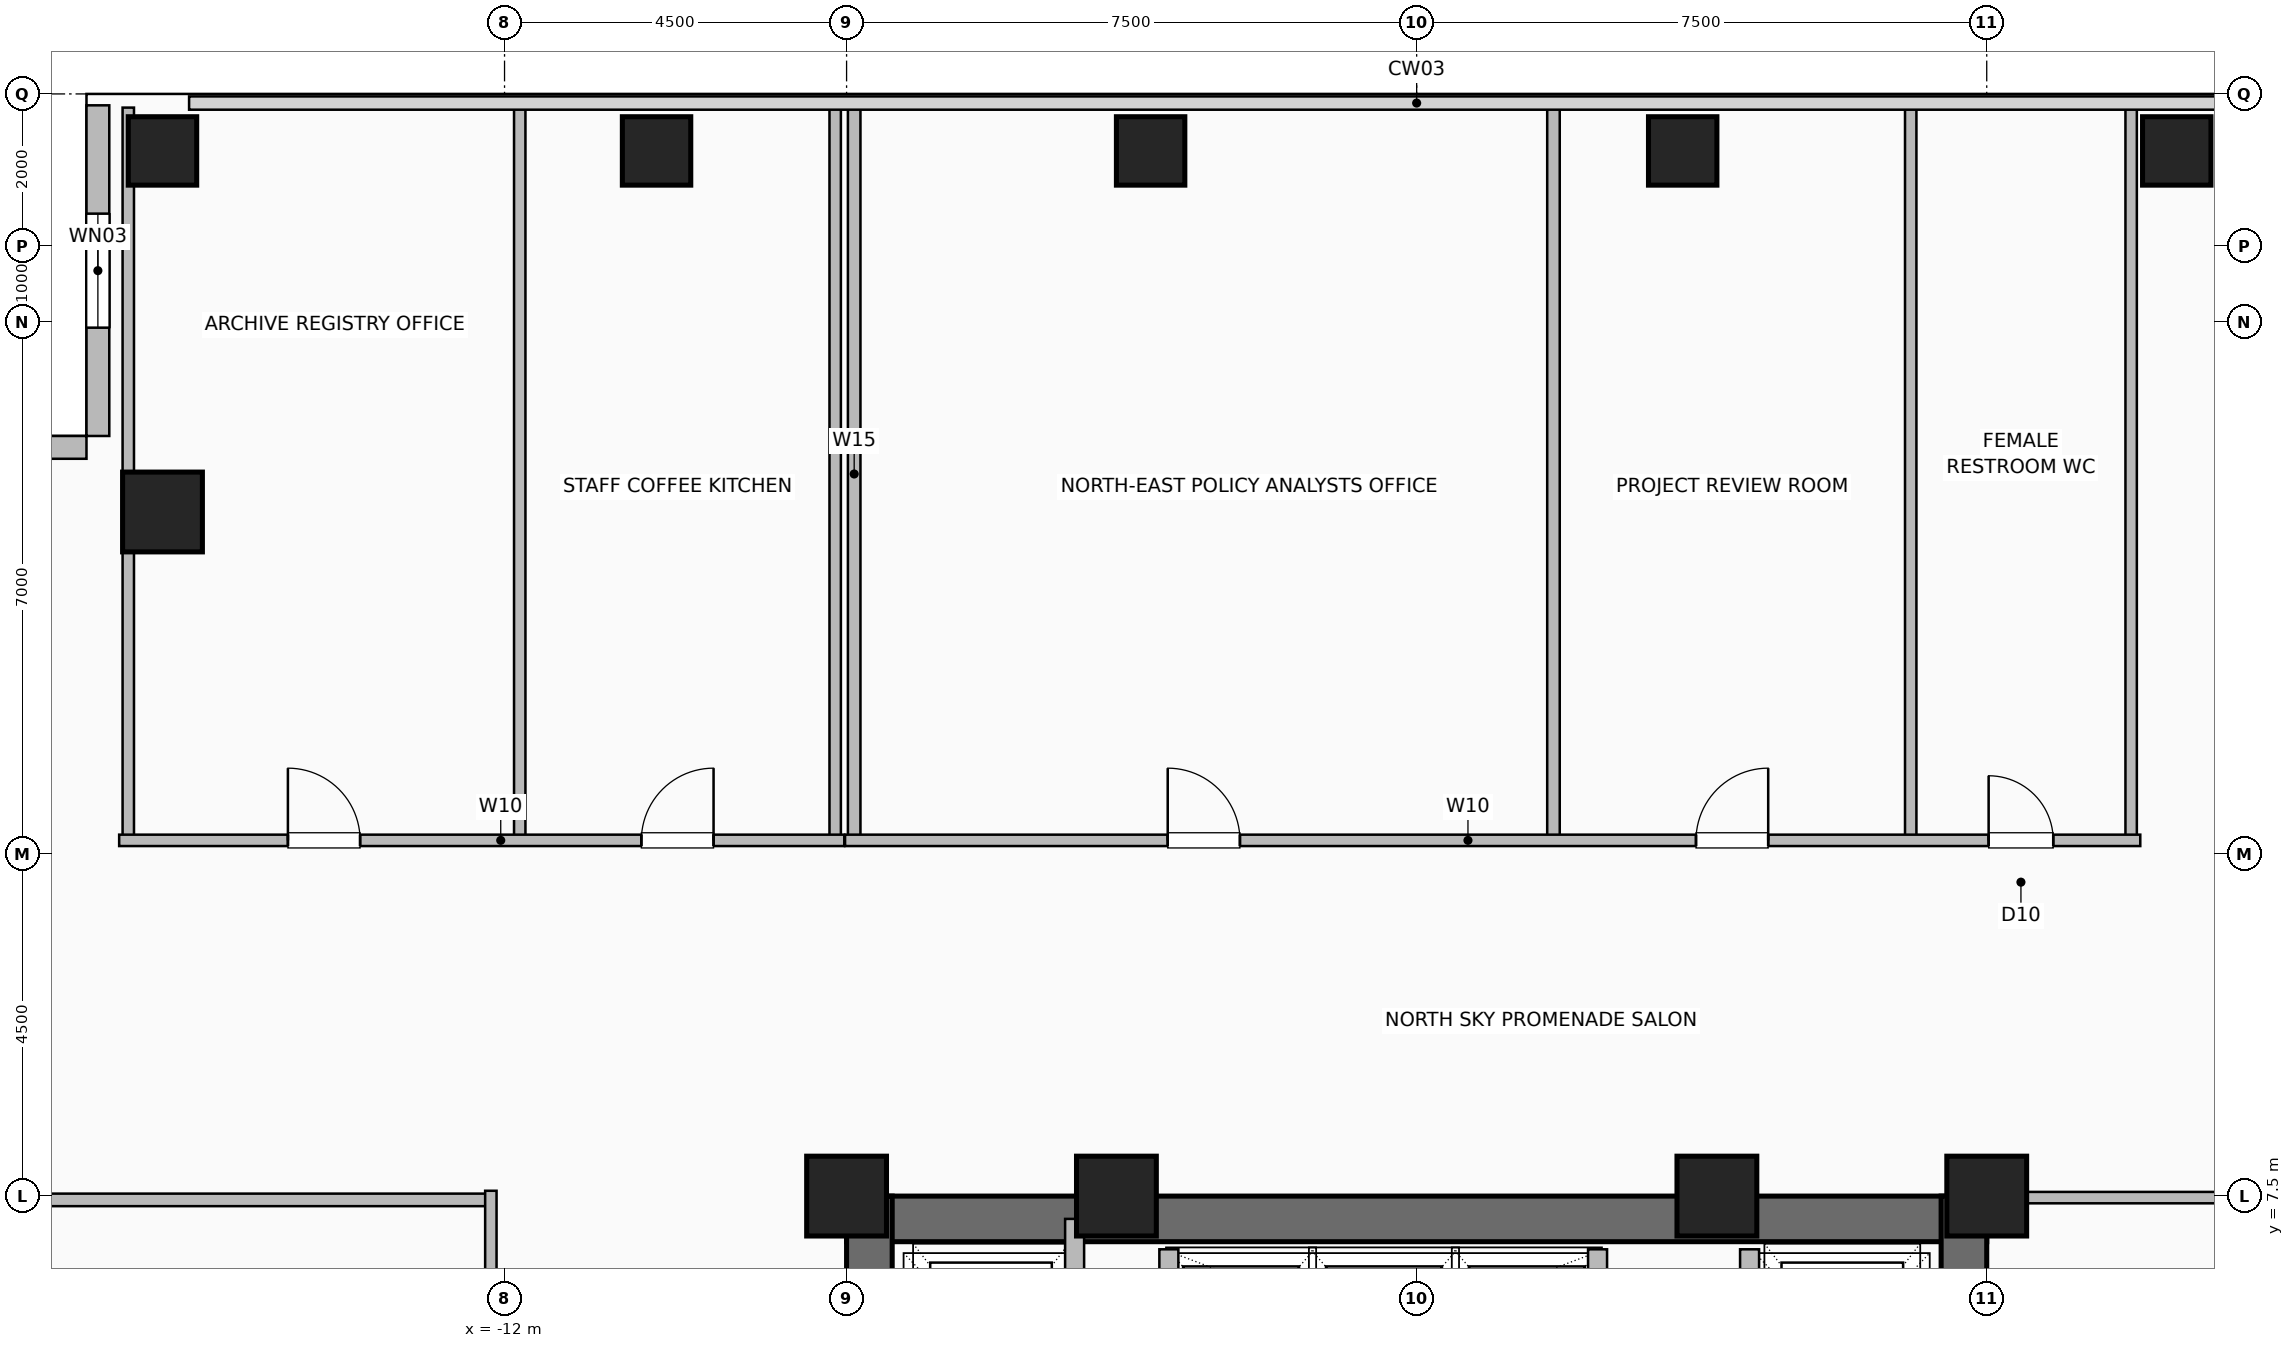
"""IFC4 building model, lengths in metres.
Left out: names, types, materials, properties, quantities, classifications, styles, units other than length and angle.
Written with IfcOpenShell. Run it as: python <this file> out.ifc"""

import sys

from ifc_helpers import new_model, si_unit, direction, frame, frame_2d, origin, origin_2d, place, context, subcontext, project, spatial, rectangle, hollow_rectangle, extrude, element, fill, save


model = new_model("IFC4")
c1 = context("Model", 3, precision=1e-05, world=origin(), true_north=direction((0.0, 1.0)))
c2 = subcontext(c1, "Body", "Model", "MODEL_VIEW")
j1 = project(units=[si_unit("LENGTHUNIT", "METRE"), si_unit("PLANEANGLEUNIT", "RADIAN")], contexts=[c1])
p1 = place(None, origin())
s1 = spatial("IfcSite", under=j1, at=p1, CompositionType="ELEMENT")
p2 = place(p1, origin())
s2 = spatial("IfcBuilding", under=s1, at=p2, CompositionType="ELEMENT")
p3 = place(p2, frame((0.0, 0.0, 108.4)))
s3 = spatial("IfcBuildingStorey", under=s2, at=p3, CompositionType="ELEMENT", Elevation=108.4)
for number, where, z_axis, x_axis in (
    (1, (7.5, 7.5, 0.0), (0.0, 0.0, 1.0), (1.0, 0.0, 0.0)),
    (2, (3.95, 7.5, 0.0), (0.0, 0.0, 1.0), (1.0, 0.0, 0.0)),
    (3, (-3.95, 7.5, 0.0), (0.0, 0.0, 1.0), (1.0, 0.0, 0.0)),
    (4, (-7.5, 7.5, 0.0), (0.0, 0.0, 1.0), (1.0, 0.0, 0.0)),
):
    element("IfcColumn", number, at=place(p3, frame(where, z_axis=z_axis, x_axis=x_axis)), inside=s3, PredefinedType="COLUMN", context=c2, shape_type="SweptSolid", body=[
        extrude(hollow_rectangle(XDim=1.05, YDim=1.05, WallThickness=0.05, at=origin_2d()), origin(), (0.0, 0.0, 1.0), 3.6),
    ])
for number, where, z_axis, x_axis in (
    (5, (-16.5, 21.25, 0.0), (0.0, 0.0, 1.0), (1.0, 0.0, 0.0)),
    (6, (-10.0, 21.25, 0.0), (0.0, 0.0, 1.0), (1.0, 0.0, 0.0)),
    (7, (-3.5, 21.25, 0.0), (0.0, 0.0, 1.0), (1.0, 0.0, 0.0)),
    (8, (3.5, 21.25, 0.0), (0.0, 0.0, 1.0), (1.0, 0.0, 0.0)),
    (9, (10.0, 21.25, 0.0), (0.0, 0.0, 1.0), (1.0, 0.0, 0.0)),
):
    element("IfcColumn", number, at=place(p3, frame(where, z_axis=z_axis, x_axis=x_axis)), inside=s3, PredefinedType="COLUMN", context=c2, shape_type="SweptSolid", body=[
        extrude(hollow_rectangle(XDim=0.9, YDim=0.9, WallThickness=0.045, at=origin_2d()), origin(), (0.0, 0.0, 1.0), 3.6),
    ])
p4 = place(p3, frame((-16.5, 16.5, 0.0), z_axis=(0.0, 0.0, 1.0), x_axis=(1.0, 0.0, 0.0)))
e10 = element("IfcColumn", 10, at=p4, inside=s3, PredefinedType="COLUMN", context=c2, shape_type="SweptSolid", body=[
    extrude(hollow_rectangle(XDim=1.05, YDim=1.05, WallThickness=0.05, at=origin_2d()), origin(), (0.0, 0.0, 1.0), 3.6),
])
p5 = place(p3, frame((-17.35, 21.85, 0.0), z_axis=(0.0, 0.0, 1.0), x_axis=(0.0, -1.0, 0.0)))
e11 = element("IfcWall", 11, at=p5, inside=s3, PredefinedType="SOLIDWALL", context=c2, shape_type="SweptSolid", body=[
    extrude(rectangle(XDim=4.35, YDim=0.3, at=frame_2d((2.175, 0.0))), origin(), (0.0, 0.0, 1.0), 3.36),
])
p6 = place(p5, frame((1.425, 0.0, 0.9)))
e12 = element("IfcOpeningElement", 12, at=p6, cuts=e11, PredefinedType="OPENING", context=c2, shape_type="SweptSolid", body=[
    extrude(rectangle(XDim=1.5, YDim=1.8, at=frame_2d((0.75, 0.9))), frame((0.0, 0.16, 0.0), z_axis=(0.0, -1.0, 0.0), x_axis=(1.0, 0.0, 0.0)), (0.0, 0.0, 1.0), 0.32),
])
p7 = place(p3, frame((-21.85, 17.35, 0.0), z_axis=(0.0, 0.0, 1.0), x_axis=(1.0, 0.0, 0.0)))
e13 = element("IfcWall", 13, at=p7, inside=s3, PredefinedType="SOLIDWALL", context=c2, shape_type="SweptSolid", body=[
    extrude(rectangle(XDim=4.35, YDim=0.3, at=frame_2d((2.175, 0.0))), origin(), (0.0, 0.0, 1.0), 3.36),
])
p8 = place(p3, frame((-7.5, 7.2, 0.0), z_axis=(0.0, 0.0, 1.0), x_axis=(1.0, 0.0, 0.0)))
e14 = element("IfcWall", 14, at=p8, inside=s3, PredefinedType="SHEAR", context=c2, shape_type="SweptSolid", body=[
    extrude(rectangle(XDim=15.0, YDim=0.6, at=frame_2d((7.5, 0.0))), origin(), (0.0, 0.0, 1.0), 3.36),
])
p9 = place(p3, frame((-7.2, -7.5, 0.0), z_axis=(0.0, 0.0, 1.0), x_axis=(0.0, 1.0, 0.0)))
e15 = element("IfcWall", 15, at=p9, inside=s3, PredefinedType="SHEAR", context=c2, shape_type="SweptSolid", body=[
    extrude(rectangle(XDim=15.0, YDim=0.6, at=frame_2d((7.5, 0.0))), origin(), (0.0, 0.0, 1.0), 3.36),
])
p10 = place(p9, frame((9.5, 0.0, 0.0)))
e16 = element("IfcOpeningElement", 16, at=p10, cuts=e15, PredefinedType="OPENING", context=c2, shape_type="SweptSolid", body=[
    extrude(rectangle(XDim=1.0, YDim=2.08, at=frame_2d((0.5, 1.04))), frame((0.0, 0.31, 0.0), z_axis=(0.0, -1.0, 0.0), x_axis=(1.0, 0.0, 0.0)), (0.0, 0.0, 1.0), 0.62),
])
p11 = place(p3, frame((7.2, -7.5, 0.0), z_axis=(0.0, 0.0, 1.0), x_axis=(0.0, 1.0, 0.0)))
e17 = element("IfcWall", 17, at=p11, inside=s3, PredefinedType="SHEAR", context=c2, shape_type="SweptSolid", body=[
    extrude(rectangle(XDim=15.0, YDim=0.6, at=frame_2d((7.5, 0.0))), origin(), (0.0, 0.0, 1.0), 3.36),
])
for number, where, z_axis, x_axis in (
    (18, (-3.26, 4.58, 0.0), (0.0, 0.0, 1.0), (0.0, 1.0, 0.0)),
    (19, (2.38, 4.58, 0.0), (0.0, 0.0, 1.0), (0.0, 1.0, 0.0)),
):
    element("IfcWall", number, at=place(p3, frame(where, z_axis=z_axis, x_axis=x_axis)), inside=s3, PredefinedType="SHEAR", context=c2, shape_type="SweptSolid", body=[
        extrude(rectangle(XDim=2.22, YDim=0.25, at=frame_2d((1.11, 0.0))), origin(), (0.0, 0.0, 1.0), 3.36),
    ])
p12 = place(p3, frame((-4.5, 4.35, 0.0), z_axis=(0.0, 0.0, 1.0), x_axis=(0.0, 1.0, 0.0)))
e20 = element("IfcWall", 20, at=p12, inside=s3, PredefinedType="SHEAR", context=c2, shape_type="SweptSolid", body=[
    extrude(rectangle(XDim=2.85, YDim=0.25, at=frame_2d((1.425, 0.0))), origin(), (0.0, 0.0, 1.0), 3.36),
])
p13 = place(p3, frame((4.38, 4.3, 0.0), z_axis=(0.0, 0.0, 1.0), x_axis=(0.0, 1.0, 0.0)))
e21 = element("IfcWall", 21, at=p13, inside=s3, PredefinedType="SHEAR", context=c2, shape_type="SweptSolid", body=[
    extrude(rectangle(XDim=2.5, YDim=0.25, at=frame_2d((1.25, 0.0))), origin(), (0.0, 0.0, 1.0), 3.36),
])
p14 = place(p13, frame((0.8, 0.0, 0.0)))
e22 = element("IfcOpeningElement", 22, at=p14, cuts=e21, PredefinedType="OPENING", context=c2, shape_type="SweptSolid", body=[
    extrude(rectangle(XDim=1.2, YDim=2.2, at=frame_2d((0.6, 1.1))), frame((0.0, 0.135, 0.0), z_axis=(0.0, -1.0, 0.0), x_axis=(1.0, 0.0, 0.0)), (0.0, 0.0, 1.0), 0.27),
])
p15 = place(p3, frame((-21.82, 7.45, 0.0), z_axis=(0.0, 0.0, 1.0), x_axis=(1.0, 0.0, 0.0)))
e23 = element("IfcWall", 23, at=p15, inside=s3, PredefinedType="PLUMBINGWALL", context=c2, shape_type="SweptSolid", body=[
    extrude(rectangle(XDim=9.64, YDim=0.165, at=frame_2d((4.82, 0.0))), origin(), (0.0, 0.0, 1.0), 3.36),
])
p16 = place(p3, frame((-12.18, -7.57, 0.0), z_axis=(0.0, 0.0, 1.0), x_axis=(0.0, 1.0, 0.0)))
e24 = element("IfcWall", 24, at=p16, inside=s3, PredefinedType="PARTITIONING", context=c2, shape_type="SweptSolid", body=[
    extrude(rectangle(XDim=15.14, YDim=0.15, at=frame_2d((7.57, 0.0))), origin(), (0.0, 0.0, 1.0), 3.36),
])
p17 = place(p16, frame((7.095, 0.0, 0.0)))
e25 = element("IfcOpeningElement", 25, at=p17, cuts=e24, PredefinedType="OPENING", context=c2, shape_type="SweptSolid", body=[
    extrude(rectangle(XDim=0.95, YDim=2.06, at=frame_2d((0.475, 1.03))), frame((0.0, 0.085, 0.0), z_axis=(0.0, -1.0, 0.0), x_axis=(1.0, 0.0, 0.0)), (0.0, 0.0, 1.0), 0.17),
])
for number, where, z_axis, x_axis in (
    (26, (-16.95, 12.18, 0.0), (0.0, 0.0, 1.0), (0.0, 1.0, 0.0)),
    (27, (-11.8, 12.18, 0.0), (0.0, 0.0, 1.0), (0.0, 1.0, 0.0)),
    (28, (-7.65, 12.18, 0.0), (0.0, 0.0, 1.0), (0.0, 1.0, 0.0)),
):
    element("IfcWall", number, at=place(p3, frame(where, z_axis=z_axis, x_axis=x_axis)), inside=s3, PredefinedType="PARTITIONING", context=c2, shape_type="SweptSolid", body=[
        extrude(rectangle(XDim=9.64, YDim=0.15, at=frame_2d((4.82, 0.0))), origin(), (0.0, 0.0, 1.0), 3.36),
    ])
p18 = place(p3, frame((-17.07, 12.18, 0.0), z_axis=(0.0, 0.0, 1.0), x_axis=(1.0, 0.0, 0.0)))
e29 = element("IfcWall", 29, at=p18, inside=s3, PredefinedType="PARTITIONING", context=c2, shape_type="SweptSolid", body=[
    extrude(rectangle(XDim=9.54, YDim=0.15, at=frame_2d((4.77, 0.0))), origin(), (0.0, 0.0, 1.0), 3.36),
])
p19 = place(p18, frame((2.22, 0.0, 0.0)))
e30 = element("IfcOpeningElement", 30, at=p19, cuts=e29, PredefinedType="OPENING", context=c2, shape_type="SweptSolid", body=[
    extrude(rectangle(XDim=0.95, YDim=2.06, at=frame_2d((0.475, 1.03))), frame((0.0, 0.085, 0.0), z_axis=(0.0, -1.0, 0.0), x_axis=(1.0, 0.0, 0.0)), (0.0, 0.0, 1.0), 0.17),
])
p20 = place(p18, frame((6.87, 0.0, 0.0)))
e31 = element("IfcOpeningElement", 31, at=p20, cuts=e29, PredefinedType="OPENING", context=c2, shape_type="SweptSolid", body=[
    extrude(rectangle(XDim=0.95, YDim=2.06, at=frame_2d((0.475, 1.03))), frame((0.0, 0.085, 0.0), z_axis=(0.0, -1.0, 0.0), x_axis=(1.0, 0.0, 0.0)), (0.0, 0.0, 1.0), 0.17),
])
for number, where, z_axis, x_axis in (
    (32, (-7.4, 12.18, 0.0), (0.0, 0.0, 1.0), (0.0, 1.0, 0.0)),
    (33, (1.8, 12.18, 0.0), (0.0, 0.0, 1.0), (0.0, 1.0, 0.0)),
):
    element("IfcWall", number, at=place(p3, frame(where, z_axis=z_axis, x_axis=x_axis)), inside=s3, PredefinedType="PLUMBINGWALL", context=c2, shape_type="SweptSolid", body=[
        extrude(rectangle(XDim=9.64, YDim=0.165, at=frame_2d((4.82, 0.0))), origin(), (0.0, 0.0, 1.0), 3.36),
    ])
for number, where, z_axis, x_axis in (
    (34, (6.5, 12.18, 0.0), (0.0, 0.0, 1.0), (0.0, 1.0, 0.0)),
    (35, (9.4, 12.18, 0.0), (0.0, 0.0, 1.0), (0.0, 1.0, 0.0)),
):
    element("IfcWall", number, at=place(p3, frame(where, z_axis=z_axis, x_axis=x_axis)), inside=s3, PredefinedType="PARTITIONING", context=c2, shape_type="SweptSolid", body=[
        extrude(rectangle(XDim=9.64, YDim=0.15, at=frame_2d((4.82, 0.0))), origin(), (0.0, 0.0, 1.0), 3.36),
    ])
p21 = place(p3, frame((-7.52, 12.18, 0.0), z_axis=(0.0, 0.0, 1.0), x_axis=(1.0, 0.0, 0.0)))
e36 = element("IfcWall", 36, at=p21, inside=s3, PredefinedType="PARTITIONING", context=c2, shape_type="SweptSolid", body=[
    extrude(rectangle(XDim=17.04, YDim=0.15, at=frame_2d((8.52, 0.0))), origin(), (0.0, 0.0, 1.0), 3.36),
])
p22 = place(p21, frame((4.245, 0.0, 0.0)))
e37 = element("IfcOpeningElement", 37, at=p22, cuts=e36, PredefinedType="OPENING", context=c2, shape_type="SweptSolid", body=[
    extrude(rectangle(XDim=0.95, YDim=2.06, at=frame_2d((0.475, 1.03))), frame((0.0, 0.085, 0.0), z_axis=(0.0, -1.0, 0.0), x_axis=(1.0, 0.0, 0.0)), (0.0, 0.0, 1.0), 0.17),
])
p23 = place(p21, frame((11.195, 0.0, 0.0)))
e38 = element("IfcOpeningElement", 38, at=p23, cuts=e36, PredefinedType="OPENING", context=c2, shape_type="SweptSolid", body=[
    extrude(rectangle(XDim=0.95, YDim=2.06, at=frame_2d((0.475, 1.03))), frame((0.0, 0.085, 0.0), z_axis=(0.0, -1.0, 0.0), x_axis=(1.0, 0.0, 0.0)), (0.0, 0.0, 1.0), 0.17),
])
p24 = place(p21, frame((15.045, 0.0, 0.0)))
e39 = element("IfcOpeningElement", 39, at=p24, cuts=e36, PredefinedType="OPENING", context=c2, shape_type="SweptSolid", body=[
    extrude(rectangle(XDim=0.85, YDim=2.05, at=frame_2d((0.425, 1.025))), frame((0.0, 0.085, 0.0), z_axis=(0.0, -1.0, 0.0), x_axis=(1.0, 0.0, 0.0)), (0.0, 0.0, 1.0), 0.17),
])
p25 = place(p3, frame((7.6, 7.48, 0.0), z_axis=(0.0, 0.0, 1.0), x_axis=(1.0, 0.0, 0.0)))
e40 = element("IfcWall", 40, at=p25, inside=s3, PredefinedType="PARTITIONING", context=c2, shape_type="SweptSolid", body=[
    extrude(rectangle(XDim=14.22, YDim=0.15, at=frame_2d((7.11, 0.0))), origin(), (0.0, 0.0, 1.0), 3.36),
])
p26 = place(p6, origin())
e41 = element("IfcWindow", 41, at=p26, inside=s3, PartitioningType="SINGLE_PANEL", PredefinedType="WINDOW", context=c2, shape_type="SweptSolid", body=[
    extrude(rectangle(XDim=1.5, YDim=1.8, at=frame_2d((0.75, 0.9))), frame((0.0, 0.03, 0.0), z_axis=(0.0, -1.0, 0.0), x_axis=(1.0, 0.0, 0.0)), (0.0, 0.0, 1.0), 0.06),
])
fill(e12, e41)
p27 = place(p19, origin())
e42 = element("IfcDoor", 42, at=p27, inside=s3, OperationType="SINGLE_SWING_LEFT", PredefinedType="DOOR", context=c2, shape_type="SweptSolid", body=[
    extrude(rectangle(XDim=0.95, YDim=2.06, at=frame_2d((0.475, 1.03))), frame((0.0, 0.025, 0.0), z_axis=(0.0, -1.0, 0.0), x_axis=(1.0, 0.0, 0.0)), (0.0, 0.0, 1.0), 0.05),
])
fill(e30, e42)
p28 = place(p20, origin())
e43 = element("IfcDoor", 43, at=p28, inside=s3, OperationType="SINGLE_SWING_RIGHT", PredefinedType="DOOR", context=c2, shape_type="SweptSolid", body=[
    extrude(rectangle(XDim=0.95, YDim=2.06, at=frame_2d((0.475, 1.03))), frame((0.0, 0.025, 0.0), z_axis=(0.0, -1.0, 0.0), x_axis=(1.0, 0.0, 0.0)), (0.0, 0.0, 1.0), 0.05),
])
fill(e31, e43)
p29 = place(p22, origin())
e44 = element("IfcDoor", 44, at=p29, inside=s3, OperationType="SINGLE_SWING_LEFT", PredefinedType="DOOR", context=c2, shape_type="SweptSolid", body=[
    extrude(rectangle(XDim=0.95, YDim=2.06, at=frame_2d((0.475, 1.03))), frame((0.0, 0.025, 0.0), z_axis=(0.0, -1.0, 0.0), x_axis=(1.0, 0.0, 0.0)), (0.0, 0.0, 1.0), 0.05),
])
fill(e37, e44)
p30 = place(p23, origin())
e45 = element("IfcDoor", 45, at=p30, inside=s3, OperationType="SINGLE_SWING_RIGHT", PredefinedType="DOOR", context=c2, shape_type="SweptSolid", body=[
    extrude(rectangle(XDim=0.95, YDim=2.06, at=frame_2d((0.475, 1.03))), frame((0.0, 0.025, 0.0), z_axis=(0.0, -1.0, 0.0), x_axis=(1.0, 0.0, 0.0)), (0.0, 0.0, 1.0), 0.05),
])
fill(e38, e45)
p31 = place(p24, origin())
e46 = element("IfcDoor", 46, at=p31, inside=s3, OperationType="SINGLE_SWING_LEFT", PredefinedType="DOOR", context=c2, shape_type="SweptSolid", body=[
    extrude(rectangle(XDim=0.85, YDim=2.05, at=frame_2d((0.425, 1.025))), frame((0.0, 0.025, 0.0), z_axis=(0.0, -1.0, 0.0), x_axis=(1.0, 0.0, 0.0)), (0.0, 0.0, 1.0), 0.05),
])
fill(e39, e46)
save(model, sys.argv[1])
